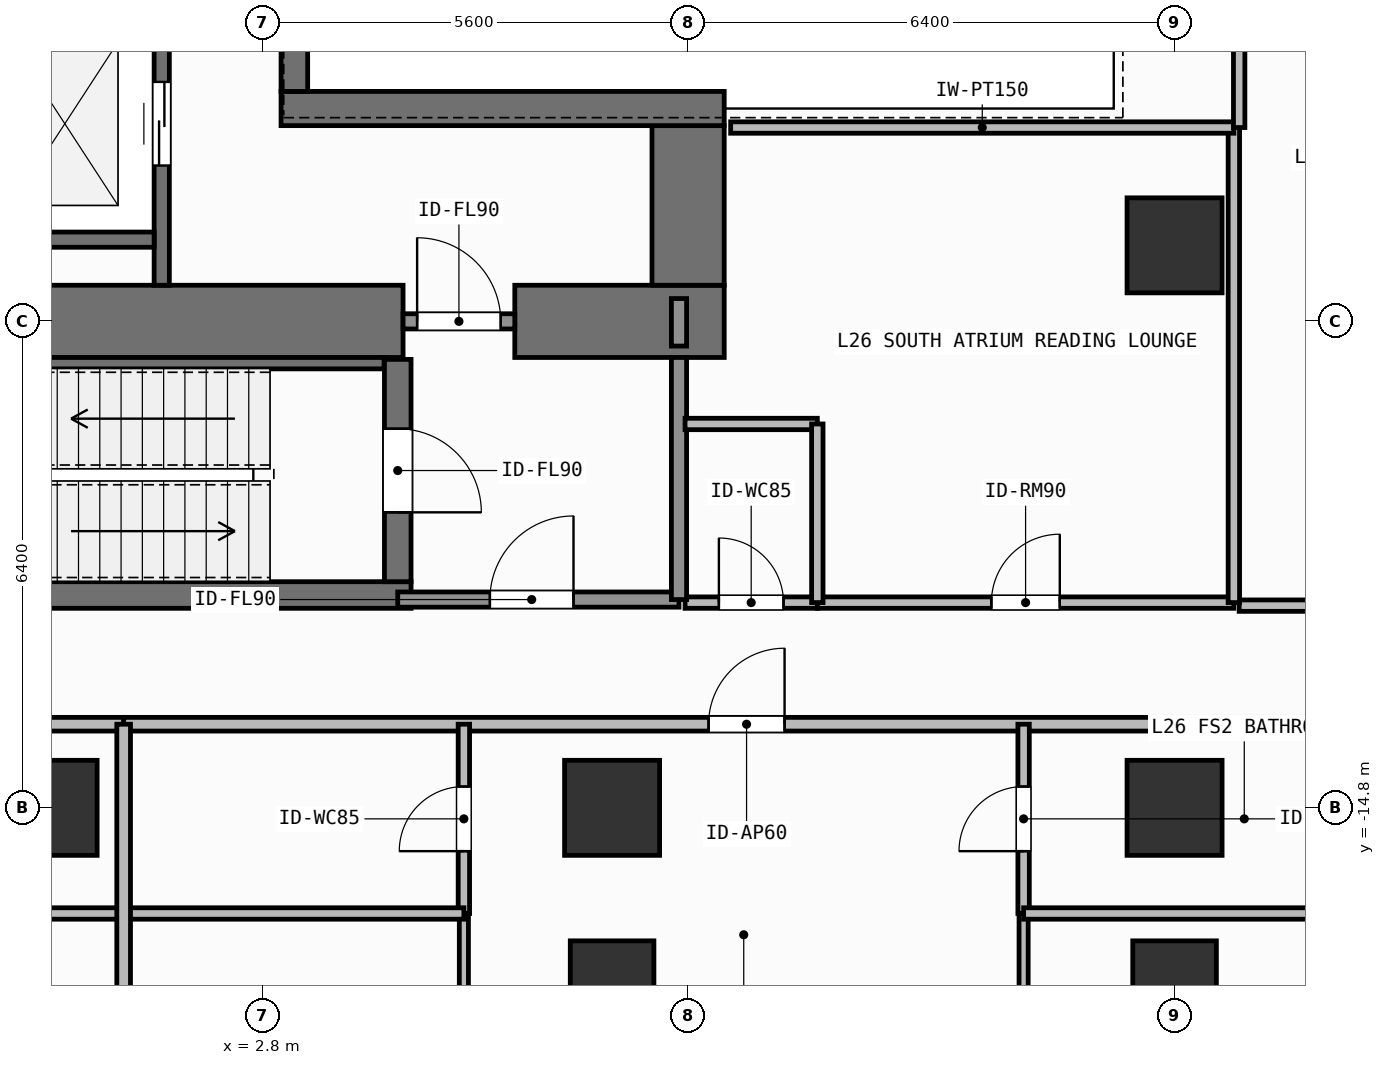
"""IFC4 building model, lengths in metres.
Left out: names, types, materials, properties, quantities, classifications, styles, units other than length and angle.
Written with IfcOpenShell. Run it as: python <this file> out.ifc"""

import sys

from ifc_helpers import new_model, si_unit, direction, frame, frame_2d, origin, origin_2d, place, context, subcontext, project, spatial, rectangle, extrude, element, fill, save


model = new_model("IFC4")
c1 = context("Model", 3, precision=1e-05, world=origin(), true_north=direction((0.0, 1.0)))
c2 = subcontext(c1, "Body", "Model", "MODEL_VIEW")
j1 = project(units=[si_unit("LENGTHUNIT", "METRE"), si_unit("PLANEANGLEUNIT", "RADIAN")], contexts=[c1])
p1 = place(None, origin())
s1 = spatial("IfcSite", under=j1, at=p1, CompositionType="ELEMENT")
p2 = place(p1, origin())
s2 = spatial("IfcBuilding", under=s1, at=p2, CompositionType="ELEMENT")
p3 = place(p2, frame((0.0, 0.0, 104.7)))
s3 = spatial("IfcBuildingStorey", under=s2, at=p3, CompositionType="ELEMENT", Elevation=104.7)
p4 = place(p3, frame((-2.62, -8.4, 0.0), z_axis=(0.0, 0.0, 1.0), x_axis=(1.0, 0.0, 0.0)))
e1 = element("IfcWall", 1, at=p4, inside=s3, PredefinedType="SHEAR", context=c2, shape_type="SweptSolid", body=[
    extrude(rectangle(XDim=7.27, YDim=0.95, at=frame_2d((3.635, 0.0))), origin(), (0.0, 0.0, 1.0), 3.9),
])
p5 = place(p3, frame((6.12, -8.4, 0.0), z_axis=(0.0, 0.0, 1.0), x_axis=(1.0, 0.0, 0.0)))
e2 = element("IfcWall", 2, at=p5, inside=s3, PredefinedType="SHEAR", context=c2, shape_type="SweptSolid", body=[
    extrude(rectangle(XDim=2.755, YDim=0.95, at=frame_2d((1.377, 0.0))), origin(), (0.0, 0.0, 1.0), 3.9),
])
p6 = place(p3, frame((8.4, -7.925, 0.0), z_axis=(0.0, 0.0, 1.0), x_axis=(0.0, 1.0, 0.0)))
e3 = element("IfcWall", 3, at=p6, inside=s3, PredefinedType="SHEAR", context=c2, shape_type="SweptSolid", body=[
    extrude(rectangle(XDim=2.1, YDim=0.95, at=frame_2d((1.05, 0.0))), origin(), (0.0, 0.0, 1.0), 3.9),
])
p7 = place(p3, frame((3.045, -5.6, 0.0), z_axis=(0.0, 0.0, 1.0), x_axis=(1.0, 0.0, 0.0)))
e4 = element("IfcWall", 4, at=p7, inside=s3, PredefinedType="SHEAR", context=c2, shape_type="SweptSolid", body=[
    extrude(rectangle(XDim=5.83, YDim=0.45, at=frame_2d((2.915, 0.0))), origin(), (0.0, 0.0, 1.0), 3.9),
])
p8 = place(p3, frame((3.22, -5.375, 0.0), z_axis=(0.0, 0.0, 1.0), x_axis=(0.0, 1.0, 0.0)))
e5 = element("IfcWall", 5, at=p8, inside=s3, PredefinedType="SHEAR", context=c2, shape_type="SweptSolid", body=[
    extrude(rectangle(XDim=10.75, YDim=0.35, at=frame_2d((5.375, 0.0))), origin(), (0.0, 0.0, 1.0), 3.9),
])
p9 = place(p3, frame((-2.555, -12.0, 0.0), z_axis=(0.0, 0.0, 1.0), x_axis=(1.0, 0.0, 0.0)))
e6 = element("IfcWall", 6, at=p9, inside=s3, PredefinedType="SHEAR", context=c2, shape_type="SweptSolid", body=[
    extrude(rectangle(XDim=7.31, YDim=0.35, at=frame_2d((3.655, 0.0))), origin(), (0.0, 0.0, 1.0), 3.9),
])
p10 = place(p3, frame((-2.2, -8.95, 0.0), z_axis=(0.0, 0.0, 1.0), x_axis=(1.0, 0.0, 0.0)))
e7 = element("IfcWall", 7, at=p10, inside=s3, PredefinedType="SHEAR", context=c2, shape_type="SweptSolid", body=[
    extrude(rectangle(XDim=6.6, YDim=0.15, at=frame_2d((3.3, 0.0))), origin(), (0.0, 0.0, 1.0), 3.9),
])
p11 = place(p3, frame((4.58, -8.9, 0.0), z_axis=(0.0, 0.0, 1.0), x_axis=(0.0, -1.0, 0.0)))
e8 = element("IfcWall", 8, at=p11, inside=s3, PredefinedType="SHEAR", context=c2, shape_type="SweptSolid", body=[
    extrude(rectangle(XDim=2.925, YDim=0.35, at=frame_2d((1.462, 0.0))), origin(), (0.0, 0.0, 1.0), 3.9),
])
p12 = place(p11, frame((0.913, 0.0, 0.0)))
e9 = element("IfcOpeningElement", 9, at=p12, cuts=e8, PredefinedType="OPENING", context=c2, shape_type="SweptSolid", body=[
    extrude(rectangle(XDim=1.1, YDim=2.15, at=frame_2d((0.55, 1.075))), frame((0.0, 0.185, 0.0), z_axis=(0.0, -1.0, 0.0), x_axis=(1.0, 0.0, 0.0)), (0.0, 0.0, 1.0), 0.37),
])
for number, where, z_axis, x_axis in (
    (10, (0.0, -14.8, 0.0), (0.0, 0.0, 1.0), (1.0, 0.0, 0.0)),
    (11, (7.4, -14.8, 0.0), (0.0, 0.0, 1.0), (1.0, 0.0, 0.0)),
    (12, (14.8, -14.8, 0.0), (0.0, 0.0, 1.0), (1.0, 0.0, 0.0)),
    (13, (14.8, -7.4, 0.0), (0.0, 0.0, 1.0), (1.0, 0.0, 0.0)),
):
    element("IfcColumn", number, at=place(p3, frame(where, z_axis=z_axis, x_axis=x_axis)), inside=s3, PredefinedType="COLUMN", context=c2, shape_type="SweptSolid", body=[
        extrude(rectangle(XDim=1.25, YDim=1.25, at=origin_2d()), origin(), (0.0, 0.0, 1.0), 3.9),
    ])
for number, where, z_axis, x_axis in (
    (14, (7.4, -17.1, 0.0), (0.0, 0.0, 1.0), (1.0, 0.0, 0.0)),
    (15, (14.8, -17.1, 0.0), (0.0, 0.0, 1.0), (1.0, 0.0, 0.0)),
):
    element("IfcColumn", number, at=place(p3, frame(where, z_axis=z_axis, x_axis=x_axis)), inside=s3, PredefinedType="COLUMN", context=c2, shape_type="SweptSolid", body=[
        extrude(rectangle(XDim=1.1, YDim=1.1, at=origin_2d()), origin(), (0.0, 0.0, 1.0), 3.9),
    ])
p13 = place(p3, frame((1.475, -7.925, 0.0), z_axis=(0.0, 0.0, 1.0), x_axis=(0.0, 1.0, 0.0)))
e16 = element("IfcWall", 16, at=p13, inside=s3, PredefinedType="SHEAR", context=c2, shape_type="SweptSolid", body=[
    extrude(rectangle(XDim=3.65, YDim=0.2, at=frame_2d((1.825, 0.0))), origin(), (0.0, 0.0, 1.0), 3.62),
])
p14 = place(p13, frame((1.575, 0.0, 0.0)))
e17 = element("IfcOpeningElement", 17, at=p14, cuts=e16, PredefinedType="OPENING", context=c2, shape_type="SweptSolid", body=[
    extrude(rectangle(XDim=1.1, YDim=2.2, at=frame_2d((0.55, 1.1))), frame((0.0, 0.11, 0.0), z_axis=(0.0, -1.0, 0.0), x_axis=(1.0, 0.0, 0.0)), (0.0, 0.0, 1.0), 0.22),
])
p15 = place(p3, frame((-0.975, -7.325, 0.0), z_axis=(0.0, 0.0, 1.0), x_axis=(1.0, 0.0, 0.0)))
e18 = element("IfcWall", 18, at=p15, inside=s3, PredefinedType="SHEAR", context=c2, shape_type="SweptSolid", body=[
    extrude(rectangle(XDim=2.35, YDim=0.2, at=frame_2d((1.175, 0.0))), origin(), (0.0, 0.0, 1.0), 3.62),
])
p16 = place(p3, frame((4.58, -12.06, 0.0), z_axis=(0.0, 0.0, 1.0), x_axis=(1.0, 0.0, 0.0)))
e19 = element("IfcWall", 19, at=p16, inside=s3, PredefinedType="SOLIDWALL", context=c2, shape_type="SweptSolid", body=[
    extrude(rectangle(XDim=3.7, YDim=0.2, at=frame_2d((1.85, 0.0))), origin(), (0.0, 0.0, 1.0), 3.62),
])
p17 = place(p16, frame((1.212, 0.0, 0.0)))
e20 = element("IfcOpeningElement", 20, at=p17, cuts=e19, PredefinedType="OPENING", context=c2, shape_type="SweptSolid", body=[
    extrude(rectangle(XDim=1.1, YDim=2.15, at=frame_2d((0.55, 1.075))), frame((0.0, 0.11, 0.0), z_axis=(0.0, -1.0, 0.0), x_axis=(1.0, 0.0, 0.0)), (0.0, 0.0, 1.0), 0.22),
])
p18 = place(p3, frame((4.65, -8.4, 0.0), z_axis=(0.0, 0.0, 1.0), x_axis=(1.0, 0.0, 0.0)))
e21 = element("IfcWall", 21, at=p18, inside=s3, PredefinedType="SOLIDWALL", context=c2, shape_type="SweptSolid", body=[
    extrude(rectangle(XDim=1.47, YDim=0.2, at=frame_2d((0.735, 0.0))), origin(), (0.0, 0.0, 1.0), 2.66),
])
p19 = place(p18, frame((0.185, 0.0, 0.0)))
e22 = element("IfcOpeningElement", 22, at=p19, cuts=e21, PredefinedType="OPENING", context=c2, shape_type="SweptSolid", body=[
    extrude(rectangle(XDim=1.1, YDim=2.15, at=frame_2d((0.55, 1.075))), frame((0.0, 0.11, 0.0), z_axis=(0.0, -1.0, 0.0), x_axis=(1.0, 0.0, 0.0)), (0.0, 0.0, 1.0), 0.22),
])
p20 = place(p3, frame((8.36, -12.1, 0.0), z_axis=(0.0, 0.0, 1.0), x_axis=(1.0, 0.0, 0.0)))
e23 = element("IfcWall", 23, at=p20, inside=s3, PredefinedType="PARTITIONING", context=c2, shape_type="SweptSolid", body=[
    extrude(rectangle(XDim=1.74, YDim=0.15, at=frame_2d((0.87, 0.0))), origin(), (0.0, 0.0, 1.0), 3.62),
])
p21 = place(p20, frame((0.445, 0.0, 0.0)))
e24 = element("IfcOpeningElement", 24, at=p21, cuts=e23, PredefinedType="OPENING", context=c2, shape_type="SweptSolid", body=[
    extrude(rectangle(XDim=0.85, YDim=2.1, at=frame_2d((0.425, 1.05))), frame((0.0, 0.085, 0.0), z_axis=(0.0, -1.0, 0.0), x_axis=(1.0, 0.0, 0.0)), (0.0, 0.0, 1.0), 0.17),
])
p22 = place(p3, frame((10.1, -12.1, 0.0), z_axis=(0.0, 0.0, 1.0), x_axis=(1.0, 0.0, 0.0)))
e25 = element("IfcWall", 25, at=p22, inside=s3, PredefinedType="PARTITIONING", context=c2, shape_type="SweptSolid", body=[
    extrude(rectangle(XDim=5.48, YDim=0.15, at=frame_2d((2.74, 0.0))), origin(), (0.0, 0.0, 1.0), 3.62),
])
p23 = place(p22, frame((2.29, 0.0, 0.0)))
e26 = element("IfcOpeningElement", 26, at=p23, cuts=e25, PredefinedType="OPENING", context=c2, shape_type="SweptSolid", body=[
    extrude(rectangle(XDim=0.9, YDim=2.1, at=frame_2d((0.45, 1.05))), frame((0.0, 0.085, 0.0), z_axis=(0.0, -1.0, 0.0), x_axis=(1.0, 0.0, 0.0)), (0.0, 0.0, 1.0), 0.17),
])
p24 = place(p3, frame((-24.42, -13.7, 0.0), z_axis=(0.0, 0.0, 1.0), x_axis=(1.0, 0.0, 0.0)))
e27 = element("IfcWall", 27, at=p24, inside=s3, PredefinedType="PARTITIONING", context=c2, shape_type="SweptSolid", body=[
    extrude(rectangle(XDim=25.394, YDim=0.18, at=frame_2d((12.697, 0.0))), origin(), (0.0, 0.0, 1.0), 3.62),
])
p25 = place(p24, frame((10.939, 0.0, 0.0)))
e28 = element("IfcOpeningElement", 28, at=p25, cuts=e27, PredefinedType="OPENING", context=c2, shape_type="SweptSolid", body=[
    extrude(rectangle(XDim=1.0, YDim=2.2, at=frame_2d((0.5, 1.1))), frame((0.0, 0.1, 0.0), z_axis=(0.0, -1.0, 0.0), x_axis=(1.0, 0.0, 0.0)), (0.0, 0.0, 1.0), 0.2),
])
p26 = place(p3, frame((0.974, -13.7, 0.0), z_axis=(0.0, 0.0, 1.0), x_axis=(1.0, 0.0, 0.0)))
e29 = element("IfcWall", 29, at=p26, inside=s3, PredefinedType="PARTITIONING", context=c2, shape_type="SweptSolid", body=[
    extrude(rectangle(XDim=17.646, YDim=0.18, at=frame_2d((8.823, 0.0))), origin(), (0.0, 0.0, 1.0), 3.62),
])
p27 = place(p26, frame((7.695, 0.0, 0.0)))
e30 = element("IfcOpeningElement", 30, at=p27, cuts=e29, PredefinedType="OPENING", context=c2, shape_type="SweptSolid", body=[
    extrude(rectangle(XDim=1.0, YDim=2.2, at=frame_2d((0.5, 1.1))), frame((0.0, 0.1, 0.0), z_axis=(0.0, -1.0, 0.0), x_axis=(1.0, 0.0, 0.0)), (0.0, 0.0, 1.0), 0.2),
])
p28 = place(p3, frame((5.45, -16.19, 0.0), z_axis=(0.0, 0.0, 1.0), x_axis=(0.0, 1.0, 0.0)))
e31 = element("IfcWall", 31, at=p28, inside=s3, PredefinedType="PARTITIONING", context=c2, shape_type="SweptSolid", body=[
    extrude(rectangle(XDim=2.49, YDim=0.15, at=frame_2d((1.245, 0.0))), origin(), (0.0, 0.0, 1.0), 3.62),
])
p29 = place(p28, frame((0.82, 0.0, 0.0)))
e32 = element("IfcOpeningElement", 32, at=p29, cuts=e31, PredefinedType="OPENING", context=c2, shape_type="SweptSolid", body=[
    extrude(rectangle(XDim=0.85, YDim=2.1, at=frame_2d((0.425, 1.05))), frame((0.0, 0.085, 0.0), z_axis=(0.0, -1.0, 0.0), x_axis=(1.0, 0.0, 0.0)), (0.0, 0.0, 1.0), 0.17),
])
p30 = place(p3, frame((5.45, -19.23, 0.0), z_axis=(0.0, 0.0, 1.0), x_axis=(0.0, 1.0, 0.0)))
e33 = element("IfcWall", 33, at=p30, inside=s3, PredefinedType="PARTITIONING", context=c2, shape_type="SweptSolid", body=[
    extrude(rectangle(XDim=3.04, YDim=0.12, at=frame_2d((1.52, 0.0))), origin(), (0.0, 0.0, 1.0), 3.62),
])
p31 = place(p30, frame((0.491, 0.0, 0.0)))
e34 = element("IfcOpeningElement", 34, at=p31, cuts=e33, PredefinedType="OPENING", context=c2, shape_type="SweptSolid", body=[
    extrude(rectangle(XDim=0.9, YDim=2.1, at=frame_2d((0.45, 1.05))), frame((0.0, 0.07, 0.0), z_axis=(0.0, -1.0, 0.0), x_axis=(1.0, 0.0, 0.0)), (0.0, 0.0, 1.0), 0.14),
])
p32 = place(p3, frame((12.814, -16.19, 0.0), z_axis=(0.0, 0.0, 1.0), x_axis=(0.0, 1.0, 0.0)))
e35 = element("IfcWall", 35, at=p32, inside=s3, PredefinedType="PARTITIONING", context=c2, shape_type="SweptSolid", body=[
    extrude(rectangle(XDim=2.49, YDim=0.15, at=frame_2d((1.245, 0.0))), origin(), (0.0, 0.0, 1.0), 3.62),
])
p33 = place(p32, frame((0.82, 0.0, 0.0)))
e36 = element("IfcOpeningElement", 36, at=p33, cuts=e35, PredefinedType="OPENING", context=c2, shape_type="SweptSolid", body=[
    extrude(rectangle(XDim=0.85, YDim=2.1, at=frame_2d((0.425, 1.05))), frame((0.0, 0.085, 0.0), z_axis=(0.0, -1.0, 0.0), x_axis=(1.0, 0.0, 0.0)), (0.0, 0.0, 1.0), 0.17),
])
p34 = place(p3, frame((12.814, -19.23, 0.0), z_axis=(0.0, 0.0, 1.0), x_axis=(0.0, 1.0, 0.0)))
e37 = element("IfcWall", 37, at=p34, inside=s3, PredefinedType="PARTITIONING", context=c2, shape_type="SweptSolid", body=[
    extrude(rectangle(XDim=3.04, YDim=0.12, at=frame_2d((1.52, 0.0))), origin(), (0.0, 0.0, 1.0), 3.62),
])
p35 = place(p34, frame((0.491, 0.0, 0.0)))
e38 = element("IfcOpeningElement", 38, at=p35, cuts=e37, PredefinedType="OPENING", context=c2, shape_type="SweptSolid", body=[
    extrude(rectangle(XDim=0.9, YDim=2.1, at=frame_2d((0.45, 1.05))), frame((0.0, 0.07, 0.0), z_axis=(0.0, -1.0, 0.0), x_axis=(1.0, 0.0, 0.0)), (0.0, 0.0, 1.0), 0.14),
])
p36 = place(p3, frame((15.65, -12.14, 0.0), z_axis=(0.0, 0.0, 1.0), x_axis=(1.0, 0.0, 0.0)))
e39 = element("IfcWall", 39, at=p36, inside=s3, PredefinedType="PARTITIONING", context=c2, shape_type="SweptSolid", body=[
    extrude(rectangle(XDim=6.47, YDim=0.15, at=frame_2d((3.235, 0.0))), origin(), (0.0, 0.0, 1.0), 3.62),
])
p37 = place(p36, frame((2.61, 0.0, 0.0)))
e40 = element("IfcOpeningElement", 40, at=p37, cuts=e39, PredefinedType="OPENING", context=c2, shape_type="SweptSolid", body=[
    extrude(rectangle(XDim=0.9, YDim=2.1, at=frame_2d((0.45, 1.05))), frame((0.0, 0.085, 0.0), z_axis=(0.0, -1.0, 0.0), x_axis=(1.0, 0.0, 0.0)), (0.0, 0.0, 1.0), 0.17),
])
p38 = place(p3, frame((8.28, -12.06, 0.0), z_axis=(0.0, 0.0, 1.0), x_axis=(0.0, 1.0, 0.0)))
e41 = element("IfcWall", 41, at=p38, inside=s3, PredefinedType="SOLIDWALL", context=c2, shape_type="SweptSolid", body=[
    extrude(rectangle(XDim=3.185, YDim=0.2, at=frame_2d((1.593, 0.0))), origin(), (0.0, 0.0, 1.0), 3.62),
])
p39 = place(p3, frame((8.28, -8.725, 0.0), z_axis=(0.0, 0.0, 1.0), x_axis=(0.0, 1.0, 0.0)))
e42 = element("IfcWall", 42, at=p39, inside=s3, PredefinedType="SOLIDWALL", context=c2, shape_type="SweptSolid", body=[
    extrude(rectangle(XDim=0.625, YDim=0.2, at=frame_2d((0.312, 0.0))), origin(), (0.0, 0.0, 1.0), 3.62),
])
p40 = place(p3, frame((8.36, -9.75, 0.0), z_axis=(0.0, 0.0, 1.0), x_axis=(1.0, 0.0, 0.0)))
e43 = element("IfcWall", 43, at=p40, inside=s3, PredefinedType="PARTITIONING", context=c2, shape_type="SweptSolid", body=[
    extrude(rectangle(XDim=1.74, YDim=0.15, at=frame_2d((0.87, 0.0))), origin(), (0.0, 0.0, 1.0), 3.62),
])
p41 = place(p3, frame((10.1, -12.1, 0.0), z_axis=(0.0, 0.0, 1.0), x_axis=(0.0, 1.0, 0.0)))
e44 = element("IfcWall", 44, at=p41, inside=s3, PredefinedType="PARTITIONING", context=c2, shape_type="SweptSolid", body=[
    extrude(rectangle(XDim=2.35, YDim=0.15, at=frame_2d((1.175, 0.0))), origin(), (0.0, 0.0, 1.0), 3.62),
])
p42 = place(p3, frame((15.58, -12.1, 0.0), z_axis=(0.0, 0.0, 1.0), x_axis=(0.0, 1.0, 0.0)))
e45 = element("IfcWall", 45, at=p42, inside=s3, PredefinedType="PARTITIONING", context=c2, shape_type="SweptSolid", body=[
    extrude(rectangle(XDim=6.25, YDim=0.15, at=frame_2d((3.125, 0.0))), origin(), (0.0, 0.0, 1.0), 3.62),
])
p43 = place(p3, frame((8.96, -5.85, 0.0), z_axis=(0.0, 0.0, 1.0), x_axis=(1.0, 0.0, 0.0)))
e46 = element("IfcWall", 46, at=p43, inside=s3, PredefinedType="PARTITIONING", context=c2, shape_type="SweptSolid", body=[
    extrude(rectangle(XDim=6.62, YDim=0.15, at=frame_2d((3.31, 0.0))), origin(), (0.0, 0.0, 1.0), 3.62),
])
p44 = place(p3, frame((-5.232, -16.19, 0.0), z_axis=(0.0, 0.0, 1.0), x_axis=(1.0, 0.0, 0.0)))
e47 = element("IfcWall", 47, at=p44, inside=s3, PredefinedType="PARTITIONING", context=c2, shape_type="SweptSolid", body=[
    extrude(rectangle(XDim=6.206, YDim=0.15, at=frame_2d((3.103, 0.0))), origin(), (0.0, 0.0, 1.0), 3.62),
])
p45 = place(p3, frame((0.974, -16.19, 0.0), z_axis=(0.0, 0.0, 1.0), x_axis=(1.0, 0.0, 0.0)))
e48 = element("IfcWall", 48, at=p45, inside=s3, PredefinedType="PARTITIONING", context=c2, shape_type="SweptSolid", body=[
    extrude(rectangle(XDim=4.476, YDim=0.15, at=frame_2d((2.238, 0.0))), origin(), (0.0, 0.0, 1.0), 3.62),
])
p46 = place(p3, frame((12.814, -16.19, 0.0), z_axis=(0.0, 0.0, 1.0), x_axis=(1.0, 0.0, 0.0)))
e49 = element("IfcWall", 49, at=p46, inside=s3, PredefinedType="PARTITIONING", context=c2, shape_type="SweptSolid", body=[
    extrude(rectangle(XDim=5.806, YDim=0.15, at=frame_2d((2.903, 0.0))), origin(), (0.0, 0.0, 1.0), 3.62),
])
p47 = place(p3, frame((0.974, -19.23, 0.0), z_axis=(0.0, 0.0, 1.0), x_axis=(0.0, 1.0, 0.0)))
e50 = element("IfcWall", 50, at=p47, inside=s3, PredefinedType="PARTITIONING", context=c2, shape_type="SweptSolid", body=[
    extrude(rectangle(XDim=5.53, YDim=0.18, at=frame_2d((2.765, 0.0))), origin(), (0.0, 0.0, 1.0), 3.62),
])
p48 = place(p3, frame((15.65, -5.85, 0.0), z_axis=(0.0, 0.0, 1.0), x_axis=(0.0, 1.0, 0.0)))
e51 = element("IfcWall", 51, at=p48, inside=s3, PredefinedType="PARTITIONING", context=c2, shape_type="SweptSolid", body=[
    extrude(rectangle(XDim=3.1, YDim=0.15, at=frame_2d((1.55, 0.0))), origin(), (0.0, 0.0, 1.0), 3.62),
])
p49 = place(p14, origin())
e52 = element("IfcDoor", 52, at=p49, inside=s3, OperationType="SLIDING_TO_LEFT", PredefinedType="DOOR", context=c2, shape_type="SweptSolid", body=[
    extrude(rectangle(XDim=1.1, YDim=2.2, at=frame_2d((0.55, 1.1))), frame((0.0, 0.025, 0.0), z_axis=(0.0, -1.0, 0.0), x_axis=(1.0, 0.0, 0.0)), (0.0, 0.0, 1.0), 0.05),
])
fill(e17, e52)
p50 = place(p12, origin())
e53 = element("IfcDoor", 53, at=p50, inside=s3, OperationType="SINGLE_SWING_RIGHT", PredefinedType="DOOR", context=c2, shape_type="SweptSolid", body=[
    extrude(rectangle(XDim=1.1, YDim=2.15, at=frame_2d((0.55, 1.075))), frame((0.0, 0.025, 0.0), z_axis=(0.0, -1.0, 0.0), x_axis=(1.0, 0.0, 0.0)), (0.0, 0.0, 1.0), 0.05),
])
fill(e9, e53)
p51 = place(p17, origin())
e54 = element("IfcDoor", 54, at=p51, inside=s3, OperationType="SINGLE_SWING_RIGHT", PredefinedType="DOOR", context=c2, shape_type="SweptSolid", body=[
    extrude(rectangle(XDim=1.1, YDim=2.15, at=frame_2d((0.55, 1.075))), frame((0.0, 0.025, 0.0), z_axis=(0.0, -1.0, 0.0), x_axis=(1.0, 0.0, 0.0)), (0.0, 0.0, 1.0), 0.05),
])
fill(e20, e54)
p52 = place(p19, origin())
e55 = element("IfcDoor", 55, at=p52, inside=s3, OperationType="SINGLE_SWING_LEFT", PredefinedType="DOOR", context=c2, shape_type="SweptSolid", body=[
    extrude(rectangle(XDim=1.1, YDim=2.15, at=frame_2d((0.55, 1.075))), frame((0.0, 0.025, 0.0), z_axis=(0.0, -1.0, 0.0), x_axis=(1.0, 0.0, 0.0)), (0.0, 0.0, 1.0), 0.05),
])
fill(e22, e55)
p53 = place(p21, origin())
e56 = element("IfcDoor", 56, at=p53, inside=s3, OperationType="SINGLE_SWING_LEFT", PredefinedType="DOOR", context=c2, shape_type="SweptSolid", body=[
    extrude(rectangle(XDim=0.85, YDim=2.1, at=frame_2d((0.425, 1.05))), frame((0.0, 0.025, 0.0), z_axis=(0.0, -1.0, 0.0), x_axis=(1.0, 0.0, 0.0)), (0.0, 0.0, 1.0), 0.05),
])
fill(e24, e56)
p54 = place(p23, origin())
e57 = element("IfcDoor", 57, at=p54, inside=s3, OperationType="SINGLE_SWING_RIGHT", PredefinedType="DOOR", context=c2, shape_type="SweptSolid", body=[
    extrude(rectangle(XDim=0.9, YDim=2.1, at=frame_2d((0.45, 1.05))), frame((0.0, 0.025, 0.0), z_axis=(0.0, -1.0, 0.0), x_axis=(1.0, 0.0, 0.0)), (0.0, 0.0, 1.0), 0.05),
])
fill(e26, e57)
p55 = place(p27, origin())
e58 = element("IfcDoor", 58, at=p55, inside=s3, OperationType="SINGLE_SWING_RIGHT", PredefinedType="DOOR", context=c2, shape_type="SweptSolid", body=[
    extrude(rectangle(XDim=1.0, YDim=2.2, at=frame_2d((0.5, 1.1))), frame((0.0, 0.025, 0.0), z_axis=(0.0, -1.0, 0.0), x_axis=(1.0, 0.0, 0.0)), (0.0, 0.0, 1.0), 0.05),
])
fill(e30, e58)
p56 = place(p29, origin())
e59 = element("IfcDoor", 59, at=p56, inside=s3, OperationType="SINGLE_SWING_LEFT", PredefinedType="DOOR", context=c2, shape_type="SweptSolid", body=[
    extrude(rectangle(XDim=0.85, YDim=2.1, at=frame_2d((0.425, 1.05))), frame((0.0, 0.025, 0.0), z_axis=(0.0, -1.0, 0.0), x_axis=(1.0, 0.0, 0.0)), (0.0, 0.0, 1.0), 0.05),
])
fill(e32, e59)
p57 = place(p33, origin())
e60 = element("IfcDoor", 60, at=p57, inside=s3, OperationType="SINGLE_SWING_LEFT", PredefinedType="DOOR", context=c2, shape_type="SweptSolid", body=[
    extrude(rectangle(XDim=0.85, YDim=2.1, at=frame_2d((0.425, 1.05))), frame((0.0, 0.025, 0.0), z_axis=(0.0, -1.0, 0.0), x_axis=(1.0, 0.0, 0.0)), (0.0, 0.0, 1.0), 0.05),
])
fill(e36, e60)
save(model, sys.argv[1])
